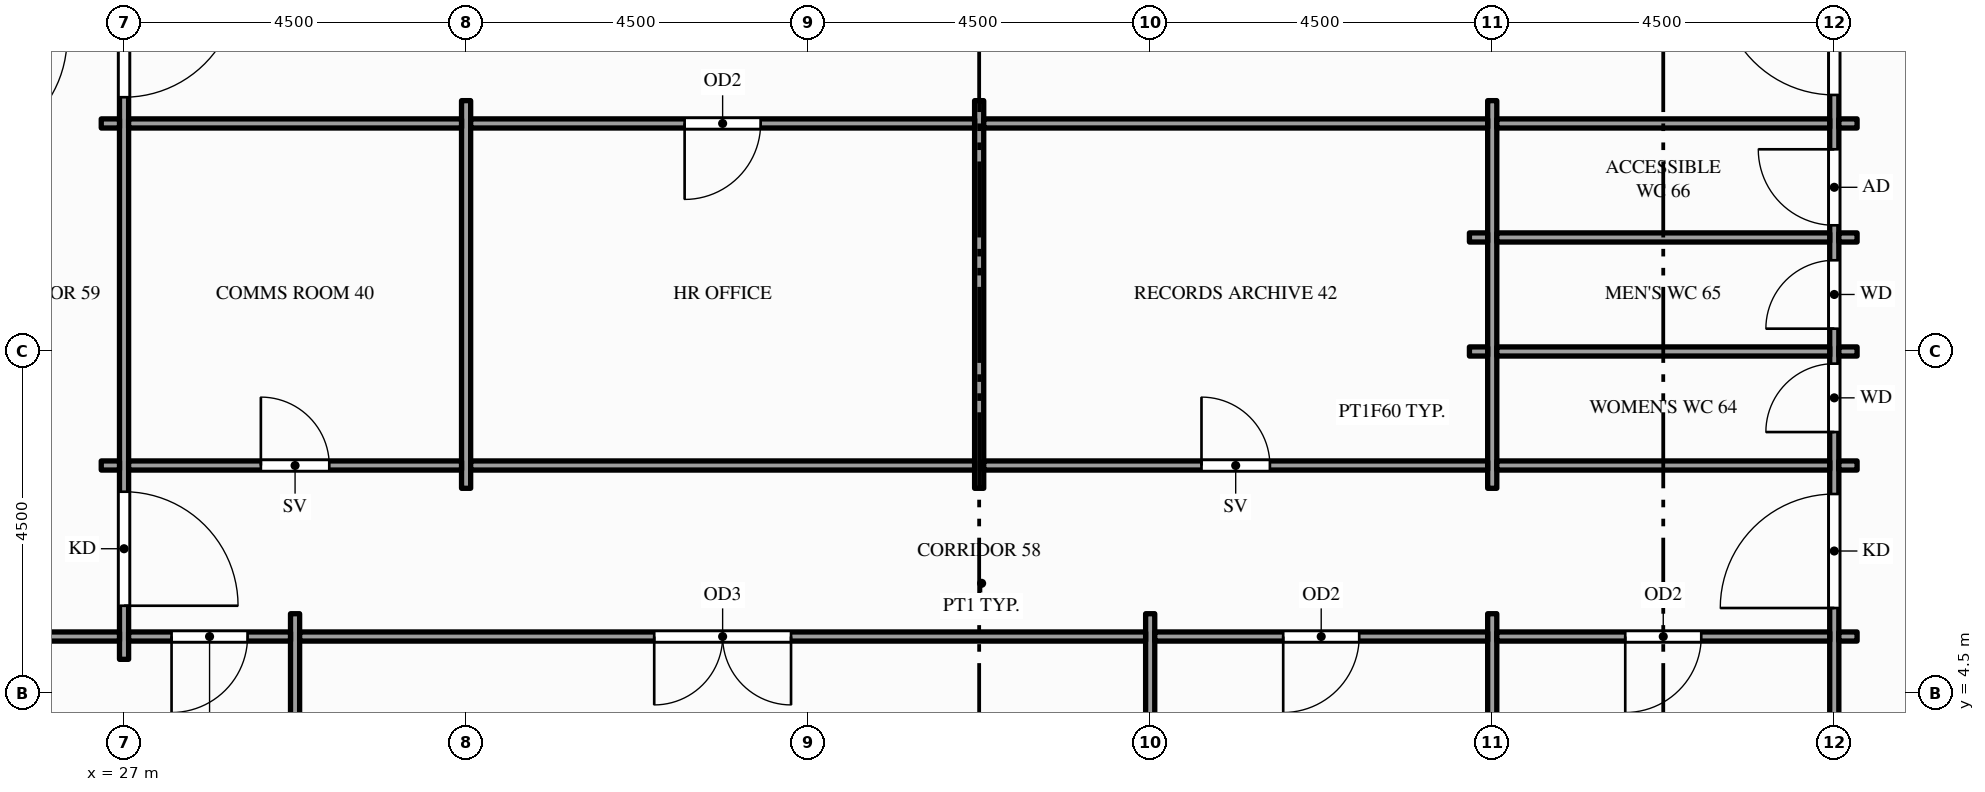
"""IFC4 building model, lengths in metres.
Left out: names, types, materials, properties, quantities, classifications, styles, units other than length and angle.
Written with IfcOpenShell. Run it as: python <this file> out.ifc"""

import sys

from ifc_helpers import new_model, si_unit, direction, frame, frame_2d, origin, place, context, subcontext, project, spatial, rectangle, extrude, element, fill, save


model = new_model("IFC4")
c1 = context("Model", 3, precision=1e-05, world=origin(), true_north=direction((0.0, 1.0)))
c2 = subcontext(c1, "Body", "Model", "MODEL_VIEW")
j1 = project(units=[si_unit("LENGTHUNIT", "METRE"), si_unit("PLANEANGLEUNIT", "RADIAN")], contexts=[c1])
p1 = place(None, origin())
s1 = spatial("IfcSite", under=j1, at=p1, CompositionType="ELEMENT")
p2 = place(p1, origin())
s2 = spatial("IfcBuilding", under=s1, at=p2, CompositionType="ELEMENT")
p3 = place(p2, frame((0.0, 0.0, 235.0)))
s3 = spatial("IfcBuildingStorey", under=s2, at=p3, CompositionType="ELEMENT", Elevation=235.0)
p4 = place(p3, frame((27.0, 4.95, 0.0), z_axis=(0.0, 0.0, 1.0), x_axis=(0.0, 1.0, 0.0)))
e1 = element("IfcWall", 1, at=p4, inside=s3, PredefinedType="PARTITIONING", context=c2, shape_type="SweptSolid", body=[
    extrude(rectangle(XDim=9.6, YDim=0.12, at=frame_2d((4.8, 0.0))), origin(), (0.0, 0.0, 1.0), 2.87),
])
p5 = place(p4, frame((0.705, 0.0, 0.0)))
e2 = element("IfcOpeningElement", 2, at=p5, cuts=e1, PredefinedType="OPENING", context=c2, shape_type="SweptSolid", body=[
    extrude(rectangle(XDim=1.5, YDim=2.1, at=frame_2d((0.75, 1.05))), frame((0.0, 0.07, 0.0), z_axis=(0.0, -1.0, 0.0), x_axis=(1.0, 0.0, 0.0)), (0.0, 0.0, 1.0), 0.14),
])
p6 = place(p4, frame((7.395, 0.0, 0.0)))
e3 = element("IfcOpeningElement", 3, at=p6, cuts=e1, PredefinedType="OPENING", context=c2, shape_type="SweptSolid", body=[
    extrude(rectangle(XDim=1.5, YDim=2.1, at=frame_2d((0.75, 1.05))), frame((0.0, 0.07, 0.0), z_axis=(0.0, -1.0, 0.0), x_axis=(1.0, 0.0, 0.0)), (0.0, 0.0, 1.0), 0.14),
])
p7 = place(p3, frame((29.25, -1.35, 0.0), z_axis=(0.0, 0.0, 1.0), x_axis=(0.0, 1.0, 0.0)))
e4 = element("IfcWall", 4, at=p7, inside=s3, PredefinedType="PARTITIONING", context=c2, shape_type="SweptSolid", body=[
    extrude(rectangle(XDim=6.9, YDim=0.12, at=frame_2d((3.45, 0.0))), origin(), (0.0, 0.0, 1.0), 2.87),
])
for number, where, z_axis, x_axis in (
    (5, (31.5, 7.2, 0.0), (0.0, 0.0, 1.0), (0.0, 1.0, 0.0)),
    (6, (38.25, 7.2, 0.0), (0.0, 0.0, 1.0), (0.0, 1.0, 0.0)),
):
    element("IfcWall", number, at=place(p3, frame(where, z_axis=z_axis, x_axis=x_axis)), inside=s3, PredefinedType="PARTITIONING", context=c2, shape_type="SweptSolid", body=[
        extrude(rectangle(XDim=5.1, YDim=0.12, at=frame_2d((2.55, 0.0))), origin(), (0.0, 0.0, 1.0), 2.87),
    ])
for number, where, z_axis, x_axis in (
    (7, (40.5, -1.35, 0.0), (0.0, 0.0, 1.0), (0.0, 1.0, 0.0)),
    (8, (45.0, -1.35, 0.0), (0.0, 0.0, 1.0), (0.0, 1.0, 0.0)),
):
    element("IfcWall", number, at=place(p3, frame(where, z_axis=z_axis, x_axis=x_axis)), inside=s3, PredefinedType="PARTITIONING", context=c2, shape_type="SweptSolid", body=[
        extrude(rectangle(XDim=6.9, YDim=0.12, at=frame_2d((3.45, 0.0))), origin(), (0.0, 0.0, 1.0), 2.87),
    ])
p8 = place(p3, frame((45.0, 7.2, 0.0), z_axis=(0.0, 0.0, 1.0), x_axis=(0.0, 1.0, 0.0)))
e9 = element("IfcWall", 9, at=p8, inside=s3, PredefinedType="PARTITIONING", context=c2, shape_type="SweptSolid", body=[
    extrude(rectangle(XDim=5.1, YDim=0.12, at=frame_2d((2.55, 0.0))), origin(), (0.0, 0.0, 1.0), 2.87),
])
p9 = place(p3, frame((49.5, -1.35, 0.0), z_axis=(0.0, 0.0, 1.0), x_axis=(0.0, 1.0, 0.0)))
e10 = element("IfcWall", 10, at=p9, inside=s3, PredefinedType="PARTITIONING", context=c2, shape_type="SweptSolid", body=[
    extrude(rectangle(XDim=22.2, YDim=0.12, at=frame_2d((11.1, 0.0))), origin(), (0.0, 0.0, 1.0), 2.87),
])
p10 = place(p9, frame((6.975, 0.0, 0.0)))
e11 = element("IfcOpeningElement", 11, at=p10, cuts=e10, PredefinedType="OPENING", context=c2, shape_type="SweptSolid", body=[
    extrude(rectangle(XDim=1.5, YDim=2.1, at=frame_2d((0.75, 1.05))), frame((0.0, 0.07, 0.0), z_axis=(0.0, -1.0, 0.0), x_axis=(1.0, 0.0, 0.0)), (0.0, 0.0, 1.0), 0.14),
])
p11 = place(p9, frame((13.725, 0.0, 0.0)))
e12 = element("IfcOpeningElement", 12, at=p11, cuts=e10, PredefinedType="OPENING", context=c2, shape_type="SweptSolid", body=[
    extrude(rectangle(XDim=1.5, YDim=2.1, at=frame_2d((0.75, 1.05))), frame((0.0, 0.07, 0.0), z_axis=(0.0, -1.0, 0.0), x_axis=(1.0, 0.0, 0.0)), (0.0, 0.0, 1.0), 0.14),
])
p12 = place(p9, frame((9.29, 0.0, 0.0)))
e13 = element("IfcOpeningElement", 13, at=p12, cuts=e10, PredefinedType="OPENING", context=c2, shape_type="SweptSolid", body=[
    extrude(rectangle(XDim=0.9, YDim=2.1, at=frame_2d((0.45, 1.05))), frame((0.0, 0.07, 0.0), z_axis=(0.0, -1.0, 0.0), x_axis=(1.0, 0.0, 0.0)), (0.0, 0.0, 1.0), 0.14),
])
p13 = place(p9, frame((10.65, 0.0, 0.0)))
e14 = element("IfcOpeningElement", 14, at=p13, cuts=e10, PredefinedType="OPENING", context=c2, shape_type="SweptSolid", body=[
    extrude(rectangle(XDim=0.9, YDim=2.1, at=frame_2d((0.45, 1.05))), frame((0.0, 0.07, 0.0), z_axis=(0.0, -1.0, 0.0), x_axis=(1.0, 0.0, 0.0)), (0.0, 0.0, 1.0), 0.14),
])
p14 = place(p9, frame((12.01, 0.0, 0.0)))
e15 = element("IfcOpeningElement", 15, at=p14, cuts=e10, PredefinedType="OPENING", context=c2, shape_type="SweptSolid", body=[
    extrude(rectangle(XDim=1.0, YDim=2.1, at=frame_2d((0.5, 1.05))), frame((0.0, 0.07, 0.0), z_axis=(0.0, -1.0, 0.0), x_axis=(1.0, 0.0, 0.0)), (0.0, 0.0, 1.0), 0.14),
])
p15 = place(p3, frame((24.81, 5.25, 0.0), z_axis=(0.0, 0.0, 1.0), x_axis=(1.0, 0.0, 0.0)))
e16 = element("IfcWall", 16, at=p15, inside=s3, PredefinedType="PARTITIONING", context=c2, shape_type="SweptSolid", body=[
    extrude(rectangle(XDim=2.13, YDim=0.12, at=frame_2d((1.065, 0.0))), origin(), (0.0, 0.0, 1.0), 2.76),
])
p16 = place(p3, frame((27.06, 5.25, 0.0), z_axis=(0.0, 0.0, 1.0), x_axis=(1.0, 0.0, 0.0)))
e17 = element("IfcWall", 17, at=p16, inside=s3, PredefinedType="PARTITIONING", context=c2, shape_type="SweptSolid", body=[
    extrude(rectangle(XDim=2.13, YDim=0.12, at=frame_2d((1.065, 0.0))), origin(), (0.0, 0.0, 1.0), 2.87),
])
p17 = place(p16, frame((0.565, 0.0, 0.0)))
e18 = element("IfcOpeningElement", 18, at=p17, cuts=e17, PredefinedType="OPENING", context=c2, shape_type="SweptSolid", body=[
    extrude(rectangle(XDim=1.0, YDim=2.1, at=frame_2d((0.5, 1.05))), frame((0.0, 0.07, 0.0), z_axis=(0.0, -1.0, 0.0), x_axis=(1.0, 0.0, 0.0)), (0.0, 0.0, 1.0), 0.14),
])
p18 = place(p3, frame((29.31, 5.25, 0.0), z_axis=(0.0, 0.0, 1.0), x_axis=(1.0, 0.0, 0.0)))
e19 = element("IfcWall", 19, at=p18, inside=s3, PredefinedType="PARTITIONING", context=c2, shape_type="SweptSolid", body=[
    extrude(rectangle(XDim=11.13, YDim=0.12, at=frame_2d((5.565, 0.0))), origin(), (0.0, 0.0, 1.0), 2.87),
])
p19 = place(p18, frame((4.665, 0.0, 0.0)))
e20 = element("IfcOpeningElement", 20, at=p19, cuts=e19, PredefinedType="OPENING", context=c2, shape_type="SweptSolid", body=[
    extrude(rectangle(XDim=1.8, YDim=2.1, at=frame_2d((0.9, 1.05))), frame((0.0, 0.07, 0.0), z_axis=(0.0, -1.0, 0.0), x_axis=(1.0, 0.0, 0.0)), (0.0, 0.0, 1.0), 0.14),
])
p20 = place(p3, frame((40.56, 5.25, 0.0), z_axis=(0.0, 0.0, 1.0), x_axis=(1.0, 0.0, 0.0)))
e21 = element("IfcWall", 21, at=p20, inside=s3, PredefinedType="PARTITIONING", context=c2, shape_type="SweptSolid", body=[
    extrude(rectangle(XDim=4.38, YDim=0.12, at=frame_2d((2.19, 0.0))), origin(), (0.0, 0.0, 1.0), 2.87),
])
p21 = place(p20, frame((1.69, 0.0, 0.0)))
e22 = element("IfcOpeningElement", 22, at=p21, cuts=e21, PredefinedType="OPENING", context=c2, shape_type="SweptSolid", body=[
    extrude(rectangle(XDim=1.0, YDim=2.1, at=frame_2d((0.5, 1.05))), frame((0.0, 0.07, 0.0), z_axis=(0.0, -1.0, 0.0), x_axis=(1.0, 0.0, 0.0)), (0.0, 0.0, 1.0), 0.14),
])
p22 = place(p3, frame((45.06, 5.25, 0.0), z_axis=(0.0, 0.0, 1.0), x_axis=(1.0, 0.0, 0.0)))
e23 = element("IfcWall", 23, at=p22, inside=s3, PredefinedType="PARTITIONING", context=c2, shape_type="SweptSolid", body=[
    extrude(rectangle(XDim=4.38, YDim=0.12, at=frame_2d((2.19, 0.0))), origin(), (0.0, 0.0, 1.0), 2.87),
])
p23 = place(p22, frame((1.69, 0.0, 0.0)))
e24 = element("IfcOpeningElement", 24, at=p23, cuts=e23, PredefinedType="OPENING", context=c2, shape_type="SweptSolid", body=[
    extrude(rectangle(XDim=1.0, YDim=2.1, at=frame_2d((0.5, 1.05))), frame((0.0, 0.07, 0.0), z_axis=(0.0, -1.0, 0.0), x_axis=(1.0, 0.0, 0.0)), (0.0, 0.0, 1.0), 0.14),
])
for number, where, z_axis, x_axis in (
    (25, (49.56, 5.25, 0.0), (0.0, 0.0, 1.0), (1.0, 0.0, 0.0)),
    (26, (26.7, 7.5, 0.0), (0.0, 0.0, 1.0), (1.0, 0.0, 0.0)),
):
    element("IfcWall", number, at=place(p3, frame(where, z_axis=z_axis, x_axis=x_axis)), inside=s3, PredefinedType="PARTITIONING", context=c2, shape_type="SweptSolid", body=[
        extrude(rectangle(XDim=0.24, YDim=0.12, at=frame_2d((0.12, 0.0))), origin(), (0.0, 0.0, 1.0), 2.87),
    ])
p24 = place(p3, frame((27.06, 7.5, 0.0), z_axis=(0.0, 0.0, 1.0), x_axis=(1.0, 0.0, 0.0)))
e27 = element("IfcWall", 27, at=p24, inside=s3, PredefinedType="PARTITIONING", context=c2, shape_type="SweptSolid", body=[
    extrude(rectangle(XDim=4.38, YDim=0.12, at=frame_2d((2.19, 0.0))), origin(), (0.0, 0.0, 1.0), 2.87),
])
p25 = place(p24, frame((1.74, 0.0, 0.0)))
e28 = element("IfcOpeningElement", 28, at=p25, cuts=e27, PredefinedType="OPENING", context=c2, shape_type="SweptSolid", body=[
    extrude(rectangle(XDim=0.9, YDim=2.1, at=frame_2d((0.45, 1.05))), frame((0.0, 0.07, 0.0), z_axis=(0.0, -1.0, 0.0), x_axis=(1.0, 0.0, 0.0)), (0.0, 0.0, 1.0), 0.14),
])
p26 = place(p3, frame((31.56, 7.5, 0.0), z_axis=(0.0, 0.0, 1.0), x_axis=(1.0, 0.0, 0.0)))
e29 = element("IfcWall", 29, at=p26, inside=s3, PredefinedType="PARTITIONING", context=c2, shape_type="SweptSolid", body=[
    extrude(rectangle(XDim=6.63, YDim=0.12, at=frame_2d((3.315, 0.0))), origin(), (0.0, 0.0, 1.0), 2.87),
])
p27 = place(p3, frame((38.31, 7.5, 0.0), z_axis=(0.0, 0.0, 1.0), x_axis=(1.0, 0.0, 0.0)))
e30 = element("IfcWall", 30, at=p27, inside=s3, PredefinedType="PARTITIONING", context=c2, shape_type="SweptSolid", body=[
    extrude(rectangle(XDim=6.63, YDim=0.12, at=frame_2d((3.315, 0.0))), origin(), (0.0, 0.0, 1.0), 2.87),
])
p28 = place(p27, frame((2.865, 0.0, 0.0)))
e31 = element("IfcOpeningElement", 31, at=p28, cuts=e30, PredefinedType="OPENING", context=c2, shape_type="SweptSolid", body=[
    extrude(rectangle(XDim=0.9, YDim=2.1, at=frame_2d((0.45, 1.05))), frame((0.0, 0.07, 0.0), z_axis=(0.0, -1.0, 0.0), x_axis=(1.0, 0.0, 0.0)), (0.0, 0.0, 1.0), 0.14),
])
p29 = place(p3, frame((45.06, 7.5, 0.0), z_axis=(0.0, 0.0, 1.0), x_axis=(1.0, 0.0, 0.0)))
e32 = element("IfcWall", 32, at=p29, inside=s3, PredefinedType="PARTITIONING", context=c2, shape_type="SweptSolid", body=[
    extrude(rectangle(XDim=4.38, YDim=0.12, at=frame_2d((2.19, 0.0))), origin(), (0.0, 0.0, 1.0), 2.87),
])
for number, where, z_axis, x_axis in (
    (33, (49.56, 7.5, 0.0), (0.0, 0.0, 1.0), (1.0, 0.0, 0.0)),
    (34, (44.7, 9.0, 0.0), (0.0, 0.0, 1.0), (1.0, 0.0, 0.0)),
):
    element("IfcWall", number, at=place(p3, frame(where, z_axis=z_axis, x_axis=x_axis)), inside=s3, PredefinedType="PARTITIONING", context=c2, shape_type="SweptSolid", body=[
        extrude(rectangle(XDim=0.24, YDim=0.12, at=frame_2d((0.12, 0.0))), origin(), (0.0, 0.0, 1.0), 2.87),
    ])
p30 = place(p3, frame((45.06, 9.0, 0.0), z_axis=(0.0, 0.0, 1.0), x_axis=(1.0, 0.0, 0.0)))
e35 = element("IfcWall", 35, at=p30, inside=s3, PredefinedType="PARTITIONING", context=c2, shape_type="SweptSolid", body=[
    extrude(rectangle(XDim=4.38, YDim=0.12, at=frame_2d((2.19, 0.0))), origin(), (0.0, 0.0, 1.0), 2.87),
])
for number, where, z_axis, x_axis in (
    (36, (49.56, 9.0, 0.0), (0.0, 0.0, 1.0), (1.0, 0.0, 0.0)),
    (37, (44.7, 10.5, 0.0), (0.0, 0.0, 1.0), (1.0, 0.0, 0.0)),
):
    element("IfcWall", number, at=place(p3, frame(where, z_axis=z_axis, x_axis=x_axis)), inside=s3, PredefinedType="PARTITIONING", context=c2, shape_type="SweptSolid", body=[
        extrude(rectangle(XDim=0.24, YDim=0.12, at=frame_2d((0.12, 0.0))), origin(), (0.0, 0.0, 1.0), 2.87),
    ])
p31 = place(p3, frame((45.06, 10.5, 0.0), z_axis=(0.0, 0.0, 1.0), x_axis=(1.0, 0.0, 0.0)))
e38 = element("IfcWall", 38, at=p31, inside=s3, PredefinedType="PARTITIONING", context=c2, shape_type="SweptSolid", body=[
    extrude(rectangle(XDim=4.38, YDim=0.12, at=frame_2d((2.19, 0.0))), origin(), (0.0, 0.0, 1.0), 2.87),
])
for number, where, z_axis, x_axis in (
    (39, (49.56, 10.5, 0.0), (0.0, 0.0, 1.0), (1.0, 0.0, 0.0)),
    (40, (26.7, 12.0, 0.0), (0.0, 0.0, 1.0), (1.0, 0.0, 0.0)),
):
    element("IfcWall", number, at=place(p3, frame(where, z_axis=z_axis, x_axis=x_axis)), inside=s3, PredefinedType="PARTITIONING", context=c2, shape_type="SweptSolid", body=[
        extrude(rectangle(XDim=0.24, YDim=0.12, at=frame_2d((0.12, 0.0))), origin(), (0.0, 0.0, 1.0), 2.87),
    ])
p32 = place(p3, frame((27.06, 12.0, 0.0), z_axis=(0.0, 0.0, 1.0), x_axis=(1.0, 0.0, 0.0)))
e41 = element("IfcWall", 41, at=p32, inside=s3, PredefinedType="PARTITIONING", context=c2, shape_type="SweptSolid", body=[
    extrude(rectangle(XDim=4.38, YDim=0.12, at=frame_2d((2.19, 0.0))), origin(), (0.0, 0.0, 1.0), 2.87),
])
p33 = place(p3, frame((31.56, 12.0, 0.0), z_axis=(0.0, 0.0, 1.0), x_axis=(1.0, 0.0, 0.0)))
e42 = element("IfcWall", 42, at=p33, inside=s3, PredefinedType="PARTITIONING", context=c2, shape_type="SweptSolid", body=[
    extrude(rectangle(XDim=6.63, YDim=0.12, at=frame_2d((3.315, 0.0))), origin(), (0.0, 0.0, 1.0), 2.87),
])
p34 = place(p33, frame((2.815, 0.0, 0.0)))
e43 = element("IfcOpeningElement", 43, at=p34, cuts=e42, PredefinedType="OPENING", context=c2, shape_type="SweptSolid", body=[
    extrude(rectangle(XDim=1.0, YDim=2.1, at=frame_2d((0.5, 1.05))), frame((0.0, 0.07, 0.0), z_axis=(0.0, -1.0, 0.0), x_axis=(1.0, 0.0, 0.0)), (0.0, 0.0, 1.0), 0.14),
])
p35 = place(p3, frame((38.31, 12.0, 0.0), z_axis=(0.0, 0.0, 1.0), x_axis=(1.0, 0.0, 0.0)))
e44 = element("IfcWall", 44, at=p35, inside=s3, PredefinedType="PARTITIONING", context=c2, shape_type="SweptSolid", body=[
    extrude(rectangle(XDim=6.63, YDim=0.12, at=frame_2d((3.315, 0.0))), origin(), (0.0, 0.0, 1.0), 2.87),
])
p36 = place(p3, frame((45.06, 12.0, 0.0), z_axis=(0.0, 0.0, 1.0), x_axis=(1.0, 0.0, 0.0)))
e45 = element("IfcWall", 45, at=p36, inside=s3, PredefinedType="PARTITIONING", context=c2, shape_type="SweptSolid", body=[
    extrude(rectangle(XDim=4.38, YDim=0.12, at=frame_2d((2.19, 0.0))), origin(), (0.0, 0.0, 1.0), 2.87),
])
p37 = place(p3, frame((49.56, 12.0, 0.0), z_axis=(0.0, 0.0, 1.0), x_axis=(1.0, 0.0, 0.0)))
e46 = element("IfcWall", 46, at=p37, inside=s3, PredefinedType="PARTITIONING", context=c2, shape_type="SweptSolid", body=[
    extrude(rectangle(XDim=0.24, YDim=0.12, at=frame_2d((0.12, 0.0))), origin(), (0.0, 0.0, 1.0), 2.87),
])
p38 = place(p5, origin())
e47 = element("IfcDoor", 47, at=p38, inside=s3, OperationType="SINGLE_SWING_LEFT", PredefinedType="DOOR", context=c2, shape_type="SweptSolid", body=[
    extrude(rectangle(XDim=1.5, YDim=2.1, at=frame_2d((0.75, 1.05))), frame((0.0, 0.025, 0.0), z_axis=(0.0, -1.0, 0.0), x_axis=(1.0, 0.0, 0.0)), (0.0, 0.0, 1.0), 0.05),
])
fill(e2, e47)
p39 = place(p6, origin())
e48 = element("IfcDoor", 48, at=p39, inside=s3, OperationType="SINGLE_SWING_RIGHT", PredefinedType="DOOR", context=c2, shape_type="SweptSolid", body=[
    extrude(rectangle(XDim=1.5, YDim=2.1, at=frame_2d((0.75, 1.05))), frame((0.0, 0.025, 0.0), z_axis=(0.0, -1.0, 0.0), x_axis=(1.0, 0.0, 0.0)), (0.0, 0.0, 1.0), 0.05),
])
fill(e3, e48)
p40 = place(p10, origin())
e49 = element("IfcDoor", 49, at=p40, inside=s3, OperationType="SINGLE_SWING_LEFT", PredefinedType="DOOR", context=c2, shape_type="SweptSolid", body=[
    extrude(rectangle(XDim=1.5, YDim=2.1, at=frame_2d((0.75, 1.05))), frame((0.0, 0.025, 0.0), z_axis=(0.0, -1.0, 0.0), x_axis=(1.0, 0.0, 0.0)), (0.0, 0.0, 1.0), 0.05),
])
fill(e11, e49)
p41 = place(p11, origin())
e50 = element("IfcDoor", 50, at=p41, inside=s3, OperationType="SINGLE_SWING_RIGHT", PredefinedType="DOOR", context=c2, shape_type="SweptSolid", body=[
    extrude(rectangle(XDim=1.5, YDim=2.1, at=frame_2d((0.75, 1.05))), frame((0.0, 0.025, 0.0), z_axis=(0.0, -1.0, 0.0), x_axis=(1.0, 0.0, 0.0)), (0.0, 0.0, 1.0), 0.05),
])
fill(e12, e50)
p42 = place(p25, origin())
e51 = element("IfcDoor", 51, at=p42, inside=s3, OperationType="SINGLE_SWING_LEFT", PredefinedType="DOOR", context=c2, shape_type="SweptSolid", body=[
    extrude(rectangle(XDim=0.9, YDim=2.1, at=frame_2d((0.45, 1.05))), frame((0.0, 0.025, 0.0), z_axis=(0.0, -1.0, 0.0), x_axis=(1.0, 0.0, 0.0)), (0.0, 0.0, 1.0), 0.05),
])
fill(e28, e51)
p43 = place(p34, origin())
e52 = element("IfcDoor", 52, at=p43, inside=s3, OperationType="SINGLE_SWING_LEFT", PredefinedType="DOOR", context=c2, shape_type="SweptSolid", body=[
    extrude(rectangle(XDim=1.0, YDim=2.1, at=frame_2d((0.5, 1.05))), frame((0.0, 0.025, 0.0), z_axis=(0.0, -1.0, 0.0), x_axis=(1.0, 0.0, 0.0)), (0.0, 0.0, 1.0), 0.05),
])
fill(e43, e52)
p44 = place(p28, origin())
e53 = element("IfcDoor", 53, at=p44, inside=s3, OperationType="SINGLE_SWING_LEFT", PredefinedType="DOOR", context=c2, shape_type="SweptSolid", body=[
    extrude(rectangle(XDim=0.9, YDim=2.1, at=frame_2d((0.45, 1.05))), frame((0.0, 0.025, 0.0), z_axis=(0.0, -1.0, 0.0), x_axis=(1.0, 0.0, 0.0)), (0.0, 0.0, 1.0), 0.05),
])
fill(e31, e53)
p45 = place(p12, origin())
e54 = element("IfcDoor", 54, at=p45, inside=s3, OperationType="SINGLE_SWING_LEFT", PredefinedType="DOOR", context=c2, shape_type="SweptSolid", body=[
    extrude(rectangle(XDim=0.9, YDim=2.1, at=frame_2d((0.45, 1.05))), frame((0.0, 0.025, 0.0), z_axis=(0.0, -1.0, 0.0), x_axis=(1.0, 0.0, 0.0)), (0.0, 0.0, 1.0), 0.05),
])
fill(e13, e54)
p46 = place(p13, origin())
e55 = element("IfcDoor", 55, at=p46, inside=s3, OperationType="SINGLE_SWING_LEFT", PredefinedType="DOOR", context=c2, shape_type="SweptSolid", body=[
    extrude(rectangle(XDim=0.9, YDim=2.1, at=frame_2d((0.45, 1.05))), frame((0.0, 0.025, 0.0), z_axis=(0.0, -1.0, 0.0), x_axis=(1.0, 0.0, 0.0)), (0.0, 0.0, 1.0), 0.05),
])
fill(e14, e55)
p47 = place(p14, origin())
e56 = element("IfcDoor", 56, at=p47, inside=s3, OperationType="SINGLE_SWING_RIGHT", PredefinedType="DOOR", context=c2, shape_type="SweptSolid", body=[
    extrude(rectangle(XDim=1.0, YDim=2.1, at=frame_2d((0.5, 1.05))), frame((0.0, 0.025, 0.0), z_axis=(0.0, -1.0, 0.0), x_axis=(1.0, 0.0, 0.0)), (0.0, 0.0, 1.0), 0.05),
])
fill(e15, e56)
p48 = place(p17, origin())
e57 = element("IfcDoor", 57, at=p48, inside=s3, OperationType="SINGLE_SWING_LEFT", PredefinedType="DOOR", context=c2, shape_type="SweptSolid", body=[
    extrude(rectangle(XDim=1.0, YDim=2.1, at=frame_2d((0.5, 1.05))), frame((0.0, 0.025, 0.0), z_axis=(0.0, -1.0, 0.0), x_axis=(1.0, 0.0, 0.0)), (0.0, 0.0, 1.0), 0.05),
])
fill(e18, e57)
p49 = place(p19, origin())
e58 = element("IfcDoor", 58, at=p49, inside=s3, OperationType="DOUBLE_DOOR_SINGLE_SWING", PredefinedType="DOOR", context=c2, shape_type="SweptSolid", body=[
    extrude(rectangle(XDim=1.8, YDim=2.1, at=frame_2d((0.9, 1.05))), frame((0.0, 0.025, 0.0), z_axis=(0.0, -1.0, 0.0), x_axis=(1.0, 0.0, 0.0)), (0.0, 0.0, 1.0), 0.05),
])
fill(e20, e58)
p50 = place(p21, origin())
e59 = element("IfcDoor", 59, at=p50, inside=s3, OperationType="SINGLE_SWING_LEFT", PredefinedType="DOOR", context=c2, shape_type="SweptSolid", body=[
    extrude(rectangle(XDim=1.0, YDim=2.1, at=frame_2d((0.5, 1.05))), frame((0.0, 0.025, 0.0), z_axis=(0.0, -1.0, 0.0), x_axis=(1.0, 0.0, 0.0)), (0.0, 0.0, 1.0), 0.05),
])
fill(e22, e59)
p51 = place(p23, origin())
e60 = element("IfcDoor", 60, at=p51, inside=s3, OperationType="SINGLE_SWING_LEFT", PredefinedType="DOOR", context=c2, shape_type="SweptSolid", body=[
    extrude(rectangle(XDim=1.0, YDim=2.1, at=frame_2d((0.5, 1.05))), frame((0.0, 0.025, 0.0), z_axis=(0.0, -1.0, 0.0), x_axis=(1.0, 0.0, 0.0)), (0.0, 0.0, 1.0), 0.05),
])
fill(e24, e60)
save(model, sys.argv[1])
